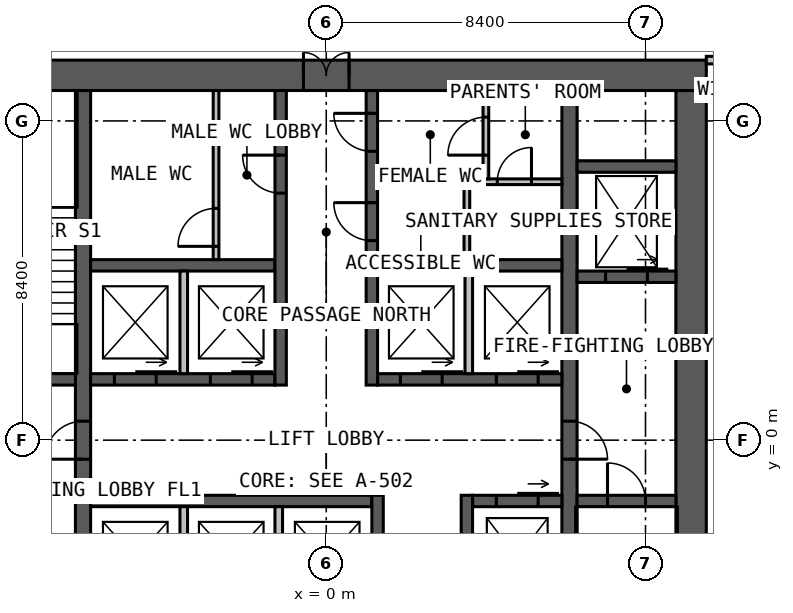
"""IFC4 building model, lengths in metres.
Left out: names, types, materials, properties, quantities, classifications, styles, units other than length and angle.
Written with IfcOpenShell. Run it as: python <this file> out.ifc"""

import sys

from ifc_helpers import new_model, si_unit, direction, frame, frame_2d, origin, place, context, subcontext, project, spatial, rectangle, extrude, element, fill, save


model = new_model("IFC4")
c1 = context("Model", 3, precision=1e-05, world=origin(), true_north=direction((0.0, 1.0)))
c2 = subcontext(c1, "Body", "Model", "MODEL_VIEW")
j1 = project(units=[si_unit("LENGTHUNIT", "METRE"), si_unit("PLANEANGLEUNIT", "RADIAN")], contexts=[c1])
p1 = place(None, origin())
s1 = spatial("IfcSite", under=j1, at=p1, CompositionType="ELEMENT")
p2 = place(p1, origin())
s2 = spatial("IfcBuilding", under=s1, at=p2, CompositionType="ELEMENT")
p3 = place(p2, frame((0.0, 0.0, 29.0)))
s3 = spatial("IfcBuildingStorey", under=s2, at=p3, CompositionType="ELEMENT", Elevation=29.0)
p4 = place(p3, frame((-10.0, 9.6, 0.0), z_axis=(0.0, 0.0, 1.0), x_axis=(1.0, 0.0, 0.0)))
e1 = element("IfcWall", 1, at=p4, inside=s3, PredefinedType="SOLIDWALL", context=c2, shape_type="SweptSolid", body=[
    extrude(rectangle(XDim=20.0, YDim=0.8, at=frame_2d((10.0, 0.0))), origin(), (0.0, 0.0, 1.0), 4.0),
])
p5 = place(p4, frame((9.4, 0.0, 0.0)))
e2 = element("IfcOpeningElement", 2, at=p5, cuts=e1, PredefinedType="OPENING", context=c2, shape_type="SweptSolid", body=[
    extrude(rectangle(XDim=1.2, YDim=2.2, at=frame_2d((0.6, 1.1))), frame((0.0, 0.41, 0.0), z_axis=(0.0, -1.0, 0.0), x_axis=(1.0, 0.0, 0.0)), (0.0, 0.0, 1.0), 0.82),
])
p6 = place(p3, frame((9.6, -9.2, 0.0), z_axis=(0.0, 0.0, 1.0), x_axis=(0.0, 1.0, 0.0)))
e3 = element("IfcWall", 3, at=p6, inside=s3, PredefinedType="SOLIDWALL", context=c2, shape_type="SweptSolid", body=[
    extrude(rectangle(XDim=18.4, YDim=0.8, at=frame_2d((9.2, 0.0))), origin(), (0.0, 0.0, 1.0), 4.0),
])
p7 = place(p3, frame((-6.4, -9.2, 0.0), z_axis=(0.0, 0.0, 1.0), x_axis=(0.0, 1.0, 0.0)))
e4 = element("IfcWall", 4, at=p7, inside=s3, PredefinedType="SOLIDWALL", context=c2, shape_type="SweptSolid", body=[
    extrude(rectangle(XDim=18.4, YDim=0.4, at=frame_2d((9.2, 0.0))), origin(), (0.0, 0.0, 1.0), 4.0),
])
p8 = place(p7, frame((8.7, 0.0, 0.0)))
e5 = element("IfcOpeningElement", 5, at=p8, cuts=e4, PredefinedType="OPENING", context=c2, shape_type="SweptSolid", body=[
    extrude(rectangle(XDim=1.0, YDim=2.2, at=frame_2d((0.5, 1.1))), frame((0.0, 0.21, 0.0), z_axis=(0.0, -1.0, 0.0), x_axis=(1.0, 0.0, 0.0)), (0.0, 0.0, 1.0), 0.42),
])
p9 = place(p3, frame((6.4, 9.2, 0.0), z_axis=(0.0, 0.0, 1.0), x_axis=(0.0, -1.0, 0.0)))
e6 = element("IfcWall", 6, at=p9, inside=s3, PredefinedType="SOLIDWALL", context=c2, shape_type="SweptSolid", body=[
    extrude(rectangle(XDim=18.4, YDim=0.4, at=frame_2d((9.2, 0.0))), origin(), (0.0, 0.0, 1.0), 4.0),
])
p10 = place(p9, frame((8.7, 0.0, 0.0)))
e7 = element("IfcOpeningElement", 7, at=p10, cuts=e6, PredefinedType="OPENING", context=c2, shape_type="SweptSolid", body=[
    extrude(rectangle(XDim=1.0, YDim=2.2, at=frame_2d((0.5, 1.1))), frame((0.0, 0.21, 0.0), z_axis=(0.0, -1.0, 0.0), x_axis=(1.0, 0.0, 0.0)), (0.0, 0.0, 1.0), 0.42),
])
p11 = place(p3, frame((-6.2, 1.6, 0.0), z_axis=(0.0, 0.0, 1.0), x_axis=(1.0, 0.0, 0.0)))
e8 = element("IfcWall", 8, at=p11, inside=s3, PredefinedType="SOLIDWALL", context=c2, shape_type="SweptSolid", body=[
    extrude(rectangle(XDim=4.85, YDim=0.3, at=frame_2d((2.425, 0.0))), origin(), (0.0, 0.0, 1.0), 4.0),
])
p12 = place(p11, frame((0.625, 0.0, 0.0)))
e9 = element("IfcOpeningElement", 9, at=p12, cuts=e8, PredefinedType="OPENING", context=c2, shape_type="SweptSolid", body=[
    extrude(rectangle(XDim=1.1, YDim=2.2, at=frame_2d((0.55, 1.1))), frame((0.0, 0.16, 0.0), z_axis=(0.0, -1.0, 0.0), x_axis=(1.0, 0.0, 0.0)), (0.0, 0.0, 1.0), 0.32),
])
p13 = place(p11, frame((3.15, 0.0, 0.0)))
e10 = element("IfcOpeningElement", 10, at=p13, cuts=e8, PredefinedType="OPENING", context=c2, shape_type="SweptSolid", body=[
    extrude(rectangle(XDim=1.1, YDim=2.2, at=frame_2d((0.55, 1.1))), frame((0.0, 0.16, 0.0), z_axis=(0.0, -1.0, 0.0), x_axis=(1.0, 0.0, 0.0)), (0.0, 0.0, 1.0), 0.32),
])
p14 = place(p3, frame((1.35, 1.6, 0.0), z_axis=(0.0, 0.0, 1.0), x_axis=(1.0, 0.0, 0.0)))
e11 = element("IfcWall", 11, at=p14, inside=s3, PredefinedType="SOLIDWALL", context=c2, shape_type="SweptSolid", body=[
    extrude(rectangle(XDim=4.85, YDim=0.3, at=frame_2d((2.425, 0.0))), origin(), (0.0, 0.0, 1.0), 4.0),
])
p15 = place(p14, frame((0.6, 0.0, 0.0)))
e12 = element("IfcOpeningElement", 12, at=p15, cuts=e11, PredefinedType="OPENING", context=c2, shape_type="SweptSolid", body=[
    extrude(rectangle(XDim=1.1, YDim=2.2, at=frame_2d((0.55, 1.1))), frame((0.0, 0.16, 0.0), z_axis=(0.0, -1.0, 0.0), x_axis=(1.0, 0.0, 0.0)), (0.0, 0.0, 1.0), 0.32),
])
p16 = place(p14, frame((3.125, 0.0, 0.0)))
e13 = element("IfcOpeningElement", 13, at=p16, cuts=e11, PredefinedType="OPENING", context=c2, shape_type="SweptSolid", body=[
    extrude(rectangle(XDim=1.1, YDim=2.2, at=frame_2d((0.55, 1.1))), frame((0.0, 0.16, 0.0), z_axis=(0.0, -1.0, 0.0), x_axis=(1.0, 0.0, 0.0)), (0.0, 0.0, 1.0), 0.32),
])
for number, where, z_axis, x_axis in (
    (14, (-6.2, 4.6, 0.0), (0.0, 0.0, 1.0), (1.0, 0.0, 0.0)),
    (15, (1.35, 4.6, 0.0), (0.0, 0.0, 1.0), (1.0, 0.0, 0.0)),
):
    element("IfcWall", number, at=place(p3, frame(where, z_axis=z_axis, x_axis=x_axis)), inside=s3, PredefinedType="SOLIDWALL", context=c2, shape_type="SweptSolid", body=[
        extrude(rectangle(XDim=4.85, YDim=0.3, at=frame_2d((2.425, 0.0))), origin(), (0.0, 0.0, 1.0), 4.0),
    ])
p17 = place(p3, frame((-1.2, 1.45, 0.0), z_axis=(0.0, 0.0, 1.0), x_axis=(0.0, 1.0, 0.0)))
e16 = element("IfcWall", 16, at=p17, inside=s3, PredefinedType="SOLIDWALL", context=c2, shape_type="SweptSolid", body=[
    extrude(rectangle(XDim=7.75, YDim=0.3, at=frame_2d((3.875, 0.0))), origin(), (0.0, 0.0, 1.0), 4.0),
])
p18 = place(p17, frame((5.05, 0.0, 0.0)))
e17 = element("IfcOpeningElement", 17, at=p18, cuts=e16, PredefinedType="OPENING", context=c2, shape_type="SweptSolid", body=[
    extrude(rectangle(XDim=1.0, YDim=2.2, at=frame_2d((0.5, 1.1))), frame((0.0, 0.16, 0.0), z_axis=(0.0, -1.0, 0.0), x_axis=(1.0, 0.0, 0.0)), (0.0, 0.0, 1.0), 0.32),
])
p19 = place(p3, frame((1.2, 1.45, 0.0), z_axis=(0.0, 0.0, 1.0), x_axis=(0.0, 1.0, 0.0)))
e18 = element("IfcWall", 18, at=p19, inside=s3, PredefinedType="SOLIDWALL", context=c2, shape_type="SweptSolid", body=[
    extrude(rectangle(XDim=7.75, YDim=0.3, at=frame_2d((3.875, 0.0))), origin(), (0.0, 0.0, 1.0), 4.0),
])
p20 = place(p19, frame((3.8, 0.0, 0.0)))
e19 = element("IfcOpeningElement", 19, at=p20, cuts=e18, PredefinedType="OPENING", context=c2, shape_type="SweptSolid", body=[
    extrude(rectangle(XDim=1.0, YDim=2.2, at=frame_2d((0.5, 1.1))), frame((0.0, 0.16, 0.0), z_axis=(0.0, -1.0, 0.0), x_axis=(1.0, 0.0, 0.0)), (0.0, 0.0, 1.0), 0.32),
])
p21 = place(p19, frame((6.15, 0.0, 0.0)))
e20 = element("IfcOpeningElement", 20, at=p21, cuts=e18, PredefinedType="OPENING", context=c2, shape_type="SweptSolid", body=[
    extrude(rectangle(XDim=1.0, YDim=2.2, at=frame_2d((0.5, 1.1))), frame((0.0, 0.16, 0.0), z_axis=(0.0, -1.0, 0.0), x_axis=(1.0, 0.0, 0.0)), (0.0, 0.0, 1.0), 0.32),
])
p22 = place(p3, frame((-6.2, -1.6, 0.0), z_axis=(0.0, 0.0, 1.0), x_axis=(1.0, 0.0, 0.0)))
e21 = element("IfcWall", 21, at=p22, inside=s3, PredefinedType="SOLIDWALL", context=c2, shape_type="SweptSolid", body=[
    extrude(rectangle(XDim=7.4, YDim=0.3, at=frame_2d((3.7, 0.0))), origin(), (0.0, 0.0, 1.0), 4.0),
])
p23 = place(p3, frame((3.85, -1.6, 0.0), z_axis=(0.0, 0.0, 1.0), x_axis=(1.0, 0.0, 0.0)))
e22 = element("IfcWall", 22, at=p23, inside=s3, PredefinedType="SOLIDWALL", context=c2, shape_type="SweptSolid", body=[
    extrude(rectangle(XDim=2.35, YDim=0.3, at=frame_2d((1.175, 0.0))), origin(), (0.0, 0.0, 1.0), 4.0),
])
p24 = place(p23, frame((0.625, 0.0, 0.0)))
e23 = element("IfcOpeningElement", 23, at=p24, cuts=e22, PredefinedType="OPENING", context=c2, shape_type="SweptSolid", body=[
    extrude(rectangle(XDim=1.1, YDim=2.2, at=frame_2d((0.55, 1.1))), frame((0.0, 0.16, 0.0), z_axis=(0.0, -1.0, 0.0), x_axis=(1.0, 0.0, 0.0)), (0.0, 0.0, 1.0), 0.32),
])
p25 = place(p3, frame((1.35, -1.45, 0.0), z_axis=(0.0, 0.0, 1.0), x_axis=(0.0, -1.0, 0.0)))
e24 = element("IfcWall", 24, at=p25, inside=s3, PredefinedType="SOLIDWALL", context=c2, shape_type="SweptSolid", body=[
    extrude(rectangle(XDim=7.75, YDim=0.3, at=frame_2d((3.875, 0.0))), origin(), (0.0, 0.0, 1.0), 4.0),
])
p26 = place(p25, frame((5.8, 0.0, 0.0)))
e25 = element("IfcOpeningElement", 25, at=p26, cuts=e24, PredefinedType="OPENING", context=c2, shape_type="SweptSolid", body=[
    extrude(rectangle(XDim=1.0, YDim=2.2, at=frame_2d((0.5, 1.1))), frame((0.0, 0.16, 0.0), z_axis=(0.0, -1.0, 0.0), x_axis=(1.0, 0.0, 0.0)), (0.0, 0.0, 1.0), 0.32),
])
p27 = place(p25, frame((3.525, 0.0, 0.0)))
e26 = element("IfcOpeningElement", 26, at=p27, cuts=e24, PredefinedType="OPENING", context=c2, shape_type="SweptSolid", body=[
    extrude(rectangle(XDim=0.9, YDim=2.2, at=frame_2d((0.45, 1.1))), frame((0.0, 0.16, 0.0), z_axis=(0.0, -1.0, 0.0), x_axis=(1.0, 0.0, 0.0)), (0.0, 0.0, 1.0), 0.32),
])
p28 = place(p3, frame((3.7, -1.45, 0.0), z_axis=(0.0, 0.0, 1.0), x_axis=(0.0, -1.0, 0.0)))
e27 = element("IfcWall", 27, at=p28, inside=s3, PredefinedType="SOLIDWALL", context=c2, shape_type="SweptSolid", body=[
    extrude(rectangle(XDim=7.75, YDim=0.3, at=frame_2d((3.875, 0.0))), origin(), (0.0, 0.0, 1.0), 4.0),
])
p29 = place(p28, frame((5.1, 0.0, 0.0)))
e28 = element("IfcOpeningElement", 28, at=p29, cuts=e27, PredefinedType="OPENING", context=c2, shape_type="SweptSolid", body=[
    extrude(rectangle(XDim=0.9, YDim=2.2, at=frame_2d((0.45, 1.1))), frame((0.0, 0.16, 0.0), z_axis=(0.0, -1.0, 0.0), x_axis=(1.0, 0.0, 0.0)), (0.0, 0.0, 1.0), 0.32),
])
p30 = place(p3, frame((-9.2, 1.6, 0.0), z_axis=(0.0, 0.0, 1.0), x_axis=(1.0, 0.0, 0.0)))
e29 = element("IfcWall", 29, at=p30, inside=s3, PredefinedType="SOLIDWALL", context=c2, shape_type="SweptSolid", body=[
    extrude(rectangle(XDim=2.6, YDim=0.3, at=frame_2d((1.3, 0.0))), origin(), (0.0, 0.0, 1.0), 4.0),
])
p31 = place(p30, frame((0.8, 0.0, 0.0)))
e30 = element("IfcOpeningElement", 30, at=p31, cuts=e29, PredefinedType="OPENING", context=c2, shape_type="SweptSolid", body=[
    extrude(rectangle(XDim=1.0, YDim=2.2, at=frame_2d((0.5, 1.1))), frame((0.0, 0.16, 0.0), z_axis=(0.0, -1.0, 0.0), x_axis=(1.0, 0.0, 0.0)), (0.0, 0.0, 1.0), 0.32),
])
p32 = place(p3, frame((6.6, -1.6, 0.0), z_axis=(0.0, 0.0, 1.0), x_axis=(1.0, 0.0, 0.0)))
e31 = element("IfcWall", 31, at=p32, inside=s3, PredefinedType="SOLIDWALL", context=c2, shape_type="SweptSolid", body=[
    extrude(rectangle(XDim=2.6, YDim=0.3, at=frame_2d((1.3, 0.0))), origin(), (0.0, 0.0, 1.0), 4.0),
])
p33 = place(p32, frame((0.8, 0.0, 0.0)))
e32 = element("IfcOpeningElement", 32, at=p33, cuts=e31, PredefinedType="OPENING", context=c2, shape_type="SweptSolid", body=[
    extrude(rectangle(XDim=1.0, YDim=2.2, at=frame_2d((0.5, 1.1))), frame((0.0, 0.16, 0.0), z_axis=(0.0, -1.0, 0.0), x_axis=(1.0, 0.0, 0.0)), (0.0, 0.0, 1.0), 0.32),
])
p34 = place(p3, frame((6.6, 4.3, 0.0), z_axis=(0.0, 0.0, 1.0), x_axis=(1.0, 0.0, 0.0)))
e33 = element("IfcWall", 33, at=p34, inside=s3, PredefinedType="SOLIDWALL", context=c2, shape_type="SweptSolid", body=[
    extrude(rectangle(XDim=2.6, YDim=0.3, at=frame_2d((1.3, 0.0))), origin(), (0.0, 0.0, 1.0), 4.0),
])
p35 = place(p34, frame((0.75, 0.0, 0.0)))
e34 = element("IfcOpeningElement", 34, at=p35, cuts=e33, PredefinedType="OPENING", context=c2, shape_type="SweptSolid", body=[
    extrude(rectangle(XDim=1.1, YDim=2.2, at=frame_2d((0.55, 1.1))), frame((0.0, 0.16, 0.0), z_axis=(0.0, -1.0, 0.0), x_axis=(1.0, 0.0, 0.0)), (0.0, 0.0, 1.0), 0.32),
])
p36 = place(p3, frame((6.6, 7.2, 0.0), z_axis=(0.0, 0.0, 1.0), x_axis=(1.0, 0.0, 0.0)))
e35 = element("IfcWall", 35, at=p36, inside=s3, PredefinedType="SOLIDWALL", context=c2, shape_type="SweptSolid", body=[
    extrude(rectangle(XDim=2.6, YDim=0.3, at=frame_2d((1.3, 0.0))), origin(), (0.0, 0.0, 1.0), 4.0),
])
for number, where, z_axis, x_axis in (
    (36, (-3.75, 1.75, 0.0), (0.0, 0.0, 1.0), (0.0, 1.0, 0.0)),
    (37, (3.75, 1.75, 0.0), (0.0, 0.0, 1.0), (0.0, 1.0, 0.0)),
    (38, (-3.75, -1.75, 0.0), (0.0, 0.0, 1.0), (0.0, -1.0, 0.0)),
    (39, (-1.25, -1.75, 0.0), (0.0, 0.0, 1.0), (0.0, -1.0, 0.0)),
):
    element("IfcWall", number, at=place(p3, frame(where, z_axis=z_axis, x_axis=x_axis)), inside=s3, PredefinedType="SOLIDWALL", context=c2, shape_type="SweptSolid", body=[
        extrude(rectangle(XDim=2.7, YDim=0.2, at=frame_2d((1.35, 0.0))), origin(), (0.0, 0.0, 1.0), 3.75),
    ])
p37 = place(p3, frame((1.35, 6.8, 0.0), z_axis=(0.0, 0.0, 1.0), x_axis=(1.0, 0.0, 0.0)))
e40 = element("IfcWall", 40, at=p37, inside=s3, PredefinedType="PARTITIONING", context=c2, shape_type="SweptSolid", body=[
    extrude(rectangle(XDim=4.85, YDim=0.15, at=frame_2d((2.425, 0.0))), origin(), (0.0, 0.0, 1.0), 3.75),
])
p38 = place(p37, frame((3.15, 0.0, 0.0)))
e41 = element("IfcOpeningElement", 41, at=p38, cuts=e40, PredefinedType="OPENING", context=c2, shape_type="SweptSolid", body=[
    extrude(rectangle(XDim=0.9, YDim=2.2, at=frame_2d((0.45, 1.1))), frame((0.0, 0.085, 0.0), z_axis=(0.0, -1.0, 0.0), x_axis=(1.0, 0.0, 0.0)), (0.0, 0.0, 1.0), 0.17),
])
p39 = place(p3, frame((3.7, 4.75, 0.0), z_axis=(0.0, 0.0, 1.0), x_axis=(0.0, 1.0, 0.0)))
e42 = element("IfcWall", 42, at=p39, inside=s3, PredefinedType="PARTITIONING", context=c2, shape_type="SweptSolid", body=[
    extrude(rectangle(XDim=1.975, YDim=0.15, at=frame_2d((0.988, 0.0))), origin(), (0.0, 0.0, 1.0), 3.75),
])
p40 = place(p3, frame((4.2, 6.875, 0.0), z_axis=(0.0, 0.0, 1.0), x_axis=(0.0, 1.0, 0.0)))
e43 = element("IfcWall", 43, at=p40, inside=s3, PredefinedType="PARTITIONING", context=c2, shape_type="SweptSolid", body=[
    extrude(rectangle(XDim=2.325, YDim=0.15, at=frame_2d((1.163, 0.0))), origin(), (0.0, 0.0, 1.0), 3.75),
])
p41 = place(p40, frame((0.625, 0.0, 0.0)))
e44 = element("IfcOpeningElement", 44, at=p41, cuts=e43, PredefinedType="OPENING", context=c2, shape_type="SweptSolid", body=[
    extrude(rectangle(XDim=1.0, YDim=2.2, at=frame_2d((0.5, 1.1))), frame((0.0, 0.085, 0.0), z_axis=(0.0, -1.0, 0.0), x_axis=(1.0, 0.0, 0.0)), (0.0, 0.0, 1.0), 0.17),
])
p42 = place(p3, frame((-2.9, 4.75, 0.0), z_axis=(0.0, 0.0, 1.0), x_axis=(0.0, 1.0, 0.0)))
e45 = element("IfcWall", 45, at=p42, inside=s3, PredefinedType="PARTITIONING", context=c2, shape_type="SweptSolid", body=[
    extrude(rectangle(XDim=4.45, YDim=0.15, at=frame_2d((2.225, 0.0))), origin(), (0.0, 0.0, 1.0), 3.75),
])
p43 = place(p42, frame((0.35, 0.0, 0.0)))
e46 = element("IfcOpeningElement", 46, at=p43, cuts=e45, PredefinedType="OPENING", context=c2, shape_type="SweptSolid", body=[
    extrude(rectangle(XDim=1.0, YDim=2.2, at=frame_2d((0.5, 1.1))), frame((0.0, 0.085, 0.0), z_axis=(0.0, -1.0, 0.0), x_axis=(1.0, 0.0, 0.0)), (0.0, 0.0, 1.0), 0.17),
])
p44 = place(p3, frame((10.0, 10.0, 0.0), z_axis=(0.0, 0.0, 1.0), x_axis=(1.0, 0.0, 0.0)))
e47 = element("IfcWall", 47, at=p44, inside=s3, PredefinedType="PARTITIONING", context=c2, shape_type="SweptSolid", body=[
    extrude(rectangle(XDim=2.0, YDim=0.2, at=frame_2d((1.0, 0.0))), origin(), (0.0, 0.0, 1.0), 3.8),
])
p45 = place(p44, frame((0.5, 0.0, 0.0)))
e48 = element("IfcOpeningElement", 48, at=p45, cuts=e47, PredefinedType="OPENING", context=c2, shape_type="SweptSolid", body=[
    extrude(rectangle(XDim=1.0, YDim=2.2, at=frame_2d((0.5, 1.1))), frame((0.0, 0.11, 0.0), z_axis=(0.0, -1.0, 0.0), x_axis=(1.0, 0.0, 0.0)), (0.0, 0.0, 1.0), 0.22),
])
p46 = place(p5, origin())
e49 = element("IfcDoor", 49, at=p46, inside=s3, OperationType="DOUBLE_DOOR_SINGLE_SWING", PredefinedType="DOOR", context=c2, shape_type="SweptSolid", body=[
    extrude(rectangle(XDim=1.2, YDim=2.2, at=frame_2d((0.6, 1.1))), frame((0.0, 0.025, 0.0), z_axis=(0.0, -1.0, 0.0), x_axis=(1.0, 0.0, 0.0)), (0.0, 0.0, 1.0), 0.05),
])
fill(e2, e49)
p47 = place(p8, origin())
e50 = element("IfcDoor", 50, at=p47, inside=s3, OperationType="SINGLE_SWING_LEFT", PredefinedType="DOOR", context=c2, shape_type="SweptSolid", body=[
    extrude(rectangle(XDim=1.0, YDim=2.2, at=frame_2d((0.5, 1.1))), frame((0.0, 0.025, 0.0), z_axis=(0.0, -1.0, 0.0), x_axis=(1.0, 0.0, 0.0)), (0.0, 0.0, 1.0), 0.05),
])
fill(e5, e50)
p48 = place(p10, origin())
e51 = element("IfcDoor", 51, at=p48, inside=s3, OperationType="SINGLE_SWING_RIGHT", PredefinedType="DOOR", context=c2, shape_type="SweptSolid", body=[
    extrude(rectangle(XDim=1.0, YDim=2.2, at=frame_2d((0.5, 1.1))), frame((0.0, 0.025, 0.0), z_axis=(0.0, -1.0, 0.0), x_axis=(1.0, 0.0, 0.0)), (0.0, 0.0, 1.0), 0.05),
])
fill(e7, e51)
p49 = place(p33, origin())
e52 = element("IfcDoor", 52, at=p49, inside=s3, OperationType="SINGLE_SWING_LEFT", PredefinedType="DOOR", context=c2, shape_type="SweptSolid", body=[
    extrude(rectangle(XDim=1.0, YDim=2.2, at=frame_2d((0.5, 1.1))), frame((0.0, 0.025, 0.0), z_axis=(0.0, -1.0, 0.0), x_axis=(1.0, 0.0, 0.0)), (0.0, 0.0, 1.0), 0.05),
])
fill(e32, e52)
p50 = place(p18, origin())
e53 = element("IfcDoor", 53, at=p50, inside=s3, OperationType="SINGLE_SWING_RIGHT", PredefinedType="DOOR", context=c2, shape_type="SweptSolid", body=[
    extrude(rectangle(XDim=1.0, YDim=2.2, at=frame_2d((0.5, 1.1))), frame((0.0, 0.025, 0.0), z_axis=(0.0, -1.0, 0.0), x_axis=(1.0, 0.0, 0.0)), (0.0, 0.0, 1.0), 0.05),
])
fill(e17, e53)
p51 = place(p20, origin())
e54 = element("IfcDoor", 54, at=p51, inside=s3, OperationType="SINGLE_SWING_RIGHT", PredefinedType="DOOR", context=c2, shape_type="SweptSolid", body=[
    extrude(rectangle(XDim=1.0, YDim=2.2, at=frame_2d((0.5, 1.1))), frame((0.0, 0.025, 0.0), z_axis=(0.0, -1.0, 0.0), x_axis=(1.0, 0.0, 0.0)), (0.0, 0.0, 1.0), 0.05),
])
fill(e19, e54)
p52 = place(p21, origin())
e55 = element("IfcDoor", 55, at=p52, inside=s3, OperationType="SINGLE_SWING_RIGHT", PredefinedType="DOOR", context=c2, shape_type="SweptSolid", body=[
    extrude(rectangle(XDim=1.0, YDim=2.2, at=frame_2d((0.5, 1.1))), frame((0.0, 0.025, 0.0), z_axis=(0.0, -1.0, 0.0), x_axis=(1.0, 0.0, 0.0)), (0.0, 0.0, 1.0), 0.05),
])
fill(e20, e55)
p53 = place(p38, origin())
e56 = element("IfcDoor", 56, at=p53, inside=s3, OperationType="SINGLE_SWING_RIGHT", PredefinedType="DOOR", context=c2, shape_type="SweptSolid", body=[
    extrude(rectangle(XDim=0.9, YDim=2.2, at=frame_2d((0.45, 1.1))), frame((0.0, 0.025, 0.0), z_axis=(0.0, -1.0, 0.0), x_axis=(1.0, 0.0, 0.0)), (0.0, 0.0, 1.0), 0.05),
])
fill(e41, e56)
p54 = place(p41, origin())
e57 = element("IfcDoor", 57, at=p54, inside=s3, OperationType="SINGLE_SWING_LEFT", PredefinedType="DOOR", context=c2, shape_type="SweptSolid", body=[
    extrude(rectangle(XDim=1.0, YDim=2.2, at=frame_2d((0.5, 1.1))), frame((0.0, 0.025, 0.0), z_axis=(0.0, -1.0, 0.0), x_axis=(1.0, 0.0, 0.0)), (0.0, 0.0, 1.0), 0.05),
])
fill(e44, e57)
p55 = place(p43, origin())
e58 = element("IfcDoor", 58, at=p55, inside=s3, OperationType="SINGLE_SWING_LEFT", PredefinedType="DOOR", context=c2, shape_type="SweptSolid", body=[
    extrude(rectangle(XDim=1.0, YDim=2.2, at=frame_2d((0.5, 1.1))), frame((0.0, 0.025, 0.0), z_axis=(0.0, -1.0, 0.0), x_axis=(1.0, 0.0, 0.0)), (0.0, 0.0, 1.0), 0.05),
])
fill(e46, e58)
p56 = place(p12, origin())
e59 = element("IfcDoor", 59, at=p56, inside=s3, OperationType="SLIDING_TO_LEFT", PredefinedType="DOOR", context=c2, shape_type="SweptSolid", body=[
    extrude(rectangle(XDim=1.1, YDim=2.2, at=frame_2d((0.55, 1.1))), frame((0.0, 0.025, 0.0), z_axis=(0.0, -1.0, 0.0), x_axis=(1.0, 0.0, 0.0)), (0.0, 0.0, 1.0), 0.05),
])
fill(e9, e59)
p57 = place(p13, origin())
e60 = element("IfcDoor", 60, at=p57, inside=s3, OperationType="SLIDING_TO_LEFT", PredefinedType="DOOR", context=c2, shape_type="SweptSolid", body=[
    extrude(rectangle(XDim=1.1, YDim=2.2, at=frame_2d((0.55, 1.1))), frame((0.0, 0.025, 0.0), z_axis=(0.0, -1.0, 0.0), x_axis=(1.0, 0.0, 0.0)), (0.0, 0.0, 1.0), 0.05),
])
fill(e10, e60)
p58 = place(p15, origin())
e61 = element("IfcDoor", 61, at=p58, inside=s3, OperationType="SLIDING_TO_LEFT", PredefinedType="DOOR", context=c2, shape_type="SweptSolid", body=[
    extrude(rectangle(XDim=1.1, YDim=2.2, at=frame_2d((0.55, 1.1))), frame((0.0, 0.025, 0.0), z_axis=(0.0, -1.0, 0.0), x_axis=(1.0, 0.0, 0.0)), (0.0, 0.0, 1.0), 0.05),
])
fill(e12, e61)
p59 = place(p16, origin())
e62 = element("IfcDoor", 62, at=p59, inside=s3, OperationType="SLIDING_TO_LEFT", PredefinedType="DOOR", context=c2, shape_type="SweptSolid", body=[
    extrude(rectangle(XDim=1.1, YDim=2.2, at=frame_2d((0.55, 1.1))), frame((0.0, 0.025, 0.0), z_axis=(0.0, -1.0, 0.0), x_axis=(1.0, 0.0, 0.0)), (0.0, 0.0, 1.0), 0.05),
])
fill(e13, e62)
p60 = place(p24, origin())
e63 = element("IfcDoor", 63, at=p60, inside=s3, OperationType="SLIDING_TO_LEFT", PredefinedType="DOOR", context=c2, shape_type="SweptSolid", body=[
    extrude(rectangle(XDim=1.1, YDim=2.2, at=frame_2d((0.55, 1.1))), frame((0.0, 0.025, 0.0), z_axis=(0.0, -1.0, 0.0), x_axis=(1.0, 0.0, 0.0)), (0.0, 0.0, 1.0), 0.05),
])
fill(e23, e63)
p61 = place(p35, origin())
e64 = element("IfcDoor", 64, at=p61, inside=s3, OperationType="SLIDING_TO_LEFT", PredefinedType="DOOR", context=c2, shape_type="SweptSolid", body=[
    extrude(rectangle(XDim=1.1, YDim=2.2, at=frame_2d((0.55, 1.1))), frame((0.0, 0.025, 0.0), z_axis=(0.0, -1.0, 0.0), x_axis=(1.0, 0.0, 0.0)), (0.0, 0.0, 1.0), 0.05),
])
fill(e34, e64)
save(model, sys.argv[1])
